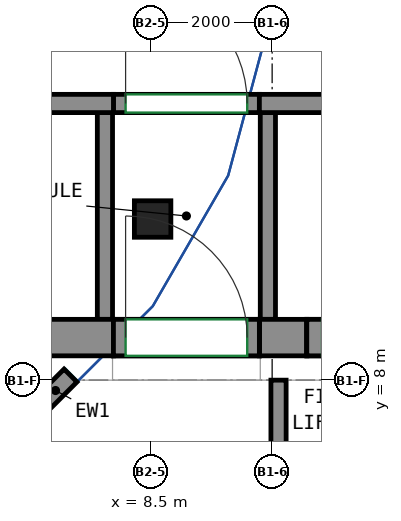
"""IFC4 building model, lengths in metres.
Left out: names, types, materials, properties, quantities, classifications, styles, units other than length and angle.
Written with IfcOpenShell. Run it as: python <this file> out.ifc"""

import sys

from ifc_helpers import new_model, si_unit, direction, frame, frame_2d, origin, origin_2d, place, context, subcontext, project, spatial, rectangle, extrude, source, transform, mapped, element, fill, save


model = new_model("IFC4")
c1 = context("Model", 3, precision=1e-05, world=origin(), true_north=direction((0.0, 1.0)))
c2 = subcontext(c1, "Body", "Model", "MODEL_VIEW")
j1 = project(units=[si_unit("LENGTHUNIT", "METRE"), si_unit("PLANEANGLEUNIT", "RADIAN")], contexts=[c1])
p1 = place(None, origin())
s1 = spatial("IfcSite", under=j1, at=p1, CompositionType="ELEMENT")
p2 = place(p1, origin())
s2 = spatial("IfcBuilding", under=s1, at=p2, CompositionType="ELEMENT")
p3 = place(p2, frame((0.0, 0.0, 323.8)))
s3 = spatial("IfcBuildingStorey", under=s2, at=p3, CompositionType="ELEMENT", Elevation=323.8)
m1 = source(origin(), c2, "Body", "SweptSolid", [
    extrude(rectangle(XDim=0.6, YDim=0.6, at=origin_2d()), origin(), (0.0, 0.0, 1.0), 4.6),
])
p4 = place(p3, frame((8.534, 10.65, 0.0), z_axis=(0.0, 0.0, 1.0), x_axis=(1.0, 0.0, 0.0)))
e1 = element("IfcColumn", 1, at=p4, inside=s3, PredefinedType="COLUMN", context=c2, shape_type="MappedRepresentation", body=[
    mapped(m1, transform((0.0, 0.0, 0.0))),
])
m2 = source(origin(), c2, "Body", "SweptSolid", [
    extrude(rectangle(XDim=14.18, YDim=0.6, at=frame_2d((7.09, 0.0))), origin(), (0.0, 0.0, 1.0), 4.6),
])
p5 = place(p3, frame((-6.29, 8.7, 0.0), z_axis=(0.0, 0.0, 1.0), x_axis=(1.0, 0.0, 0.0)))
e2 = element("IfcWall", 2, at=p5, inside=s3, PredefinedType="SHEAR", context=c2, shape_type="MappedRepresentation", body=[
    mapped(m2, transform((0.0, 0.0, 0.0))),
])
m3 = source(origin(), c2, "Body", "SweptSolid", [
    extrude(rectangle(XDim=0.78, YDim=0.6, at=frame_2d((0.39, 0.0))), origin(), (0.0, 0.0, 1.0), 5.0),
])
p6 = place(p3, frame((10.29, 8.7, -0.4), z_axis=(0.0, 0.0, 1.0), x_axis=(1.0, 0.0, 0.0)))
e3 = element("IfcWall", 3, at=p6, inside=s3, PredefinedType="SHEAR", context=c2, shape_type="MappedRepresentation", body=[
    mapped(m3, transform((0.0, 0.0, 0.0))),
])
m4 = source(origin(), c2, "Body", "SweptSolid", [
    extrude(rectangle(XDim=15.984, YDim=0.3, at=frame_2d((7.992, 0.0))), origin(), (0.0, 0.0, 1.0), 4.6),
])
p7 = place(p3, frame((-8.094, 12.55, 0.0), z_axis=(0.0, 0.0, 1.0), x_axis=(1.0, 0.0, 0.0)))
e4 = element("IfcWall", 4, at=p7, inside=s3, PredefinedType="SHEAR", context=c2, shape_type="MappedRepresentation", body=[
    mapped(m4, transform((0.0, 0.0, 0.0))),
])
m5 = source(origin(), c2, "Body", "SweptSolid", [
    extrude(rectangle(XDim=2.82, YDim=0.3, at=frame_2d((1.41, 0.0))), origin(), (0.0, 0.0, 1.0), 5.0),
])
p8 = place(p3, frame((10.29, 12.55, -0.4), z_axis=(0.0, 0.0, 1.0), x_axis=(1.0, 0.0, 0.0)))
e5 = element("IfcWall", 5, at=p8, inside=s3, PredefinedType="SHEAR", context=c2, shape_type="MappedRepresentation", body=[
    mapped(m5, transform((0.0, 0.0, 0.0))),
])
m6 = source(origin(), c2, "Body", "SweptSolid", [
    extrude(rectangle(XDim=2.4, YDim=0.6, at=frame_2d((1.2, 0.0))), origin(), (0.0, 0.0, 1.0), 0.4),
])
p9 = place(p3, frame((7.89, 8.7, 4.2), z_axis=(0.0, 0.0, 1.0), x_axis=(1.0, 0.0, 0.0)))
e6 = element("IfcWall", 6, at=p9, inside=s3, PredefinedType="SHEAR", context=c2, shape_type="MappedRepresentation", body=[
    mapped(m6, transform((0.0, 0.0, 0.0))),
])
m7 = source(origin(), c2, "Body", "SweptSolid", [
    extrude(rectangle(XDim=1.4, YDim=0.6, at=frame_2d((0.7, 0.0))), origin(), (0.0, 0.0, 1.0), 0.65),
])
p10 = place(p3, frame((11.07, 8.7, 3.95), z_axis=(0.0, 0.0, 1.0), x_axis=(1.0, 0.0, 0.0)))
e7 = element("IfcWall", 7, at=p10, inside=s3, PredefinedType="SHEAR", context=c2, shape_type="MappedRepresentation", body=[
    mapped(m7, transform((0.0, 0.0, 0.0))),
])
m8 = source(origin(), c2, "Body", "SweptSolid", [
    extrude(rectangle(XDim=0.697, YDim=0.3, at=frame_2d((0.349, 0.0))), origin(), (0.0, 0.0, 1.0), 1.2),
])
p11 = place(p3, frame((6.691, 7.583, 0.0), z_axis=(0.0, 0.0, 1.0), x_axis=(0.706931689754, 0.707281829274, 0.0)))
e8 = element("IfcWall", 8, at=p11, inside=s3, PredefinedType="SOLIDWALL", context=c2, shape_type="MappedRepresentation", body=[
    mapped(m8, transform((0.0, 0.0, 0.0))),
])
m9 = source(origin(), c2, "Body", "SweptSolid", [
    extrude(rectangle(XDim=2.4, YDim=0.3, at=frame_2d((1.2, 0.0))), origin(), (0.0, 0.0, 1.0), 4.6),
])
p12 = place(p3, frame((7.89, 12.55, 0.0), z_axis=(0.0, 0.0, 1.0), x_axis=(1.0, 0.0, 0.0)))
e9 = element("IfcWall", 9, at=p12, inside=s3, PredefinedType="PARTITIONING", context=c2, shape_type="MappedRepresentation", body=[
    mapped(m9, transform((0.0, 0.0, 0.0))),
])
p13 = place(p12, frame((0.2, 0.0, 0.0)))
e10 = element("IfcOpeningElement", 10, at=p13, cuts=e9, PredefinedType="OPENING", context=c2, shape_type="SweptSolid", body=[
    extrude(rectangle(XDim=2.0, YDim=2.1, at=frame_2d((1.0, 1.05))), frame((0.0, 0.16, 0.0), z_axis=(0.0, -1.0, 0.0), x_axis=(1.0, 0.0, 0.0)), (0.0, 0.0, 1.0), 0.32),
])
m10 = source(origin(), c2, "Body", "SweptSolid", [
    extrude(rectangle(XDim=2.65, YDim=0.25, at=frame_2d((1.325, 0.0))), origin(), (0.0, 0.0, 1.0), 4.6),
])
p14 = place(p3, frame((10.605, 5.35, 0.0), z_axis=(0.0, 0.0, 1.0), x_axis=(0.0, 1.0, 0.0)))
e11 = element("IfcWall", 11, at=p14, inside=s3, PredefinedType="PARTITIONING", context=c2, shape_type="MappedRepresentation", body=[
    mapped(m10, transform((0.0, 0.0, 0.0))),
])
m11 = source(origin(), c2, "Body", "SweptSolid", [
    extrude(rectangle(XDim=3.4, YDim=0.25, at=frame_2d((1.7, 0.0))), origin(), (0.0, 0.0, 1.0), 4.6),
])
for number, where, z_axis, x_axis in (
    (12, (10.43, 9.0, 0.0), (0.0, 0.0, 1.0), (0.0, 1.0, 0.0)),
    (13, (7.75, 9.0, 0.0), (0.0, 0.0, 1.0), (0.0, 1.0, 0.0)),
):
    element("IfcWall", number, at=place(p3, frame(where, z_axis=z_axis, x_axis=x_axis)), inside=s3, PredefinedType="PARTITIONING", context=c2, shape_type="MappedRepresentation", body=[
        mapped(m11, transform((0.0, 0.0, 0.0))),
    ])
m12 = source(origin(), c2, "Body", "SweptSolid", [
    extrude(rectangle(XDim=2.4, YDim=0.6, at=frame_2d((1.2, 0.0))), origin(), (0.0, 0.0, 1.0), 2.7),
])
p15 = place(p3, frame((7.89, 8.7, 0.0), z_axis=(0.0, 0.0, 1.0), x_axis=(1.0, 0.0, 0.0)))
e14 = element("IfcWall", 14, at=p15, inside=s3, PredefinedType="PARTITIONING", context=c2, shape_type="MappedRepresentation", body=[
    mapped(m12, transform((0.0, 0.0, 0.0))),
])
p16 = place(p15, frame((0.2, 0.0, 0.0)))
e15 = element("IfcOpeningElement", 15, at=p16, cuts=e14, PredefinedType="OPENING", context=c2, shape_type="SweptSolid", body=[
    extrude(rectangle(XDim=2.0, YDim=2.1, at=frame_2d((1.0, 1.05))), frame((0.0, 0.31, 0.0), z_axis=(0.0, -1.0, 0.0), x_axis=(1.0, 0.0, 0.0)), (0.0, 0.0, 1.0), 0.62),
])
m13 = source(origin(), c2, "Body", "SweptSolid", [
    extrude(rectangle(XDim=1.4, YDim=0.6, at=frame_2d((0.7, 0.0))), origin(), (0.0, 0.0, 1.0), 2.7),
])
p17 = place(p3, frame((11.07, 8.7, 0.0), z_axis=(0.0, 0.0, 1.0), x_axis=(1.0, 0.0, 0.0)))
e16 = element("IfcWall", 16, at=p17, inside=s3, PredefinedType="PARTITIONING", context=c2, shape_type="MappedRepresentation", body=[
    mapped(m13, transform((0.0, 0.0, 0.0))),
])
p18 = place(p17, frame((0.25, 0.0, 0.0)))
e17 = element("IfcOpeningElement", 17, at=p18, cuts=e16, PredefinedType="OPENING", context=c2, shape_type="SweptSolid", body=[
    extrude(rectangle(XDim=0.9, YDim=2.1, at=frame_2d((0.45, 1.05))), frame((0.0, 0.31, 0.0), z_axis=(0.0, -1.0, 0.0), x_axis=(1.0, 0.0, 0.0)), (0.0, 0.0, 1.0), 0.62),
])
p19 = place(p13, origin())
e18 = element("IfcDoor", 18, at=p19, inside=s3, OperationType="DOUBLE_DOOR_SINGLE_SWING", PredefinedType="DOOR", context=c2, shape_type="SweptSolid", body=[
    extrude(rectangle(XDim=2.0, YDim=2.1, at=frame_2d((1.0, 1.05))), frame((0.0, 0.025, 0.0), z_axis=(0.0, -1.0, 0.0), x_axis=(1.0, 0.0, 0.0)), (0.0, 0.0, 1.0), 0.05),
])
fill(e10, e18)
p20 = place(p16, origin())
e19 = element("IfcDoor", 19, at=p20, inside=s3, OperationType="DOUBLE_DOOR_SINGLE_SWING", PredefinedType="DOOR", context=c2, shape_type="SweptSolid", body=[
    extrude(rectangle(XDim=2.0, YDim=2.1, at=frame_2d((1.0, 1.05))), frame((0.0, 0.205, 0.0), z_axis=(0.0, -1.0, 0.0), x_axis=(1.0, 0.0, 0.0)), (0.0, 0.0, 1.0), 0.05),
])
fill(e15, e19)
save(model, sys.argv[1])
